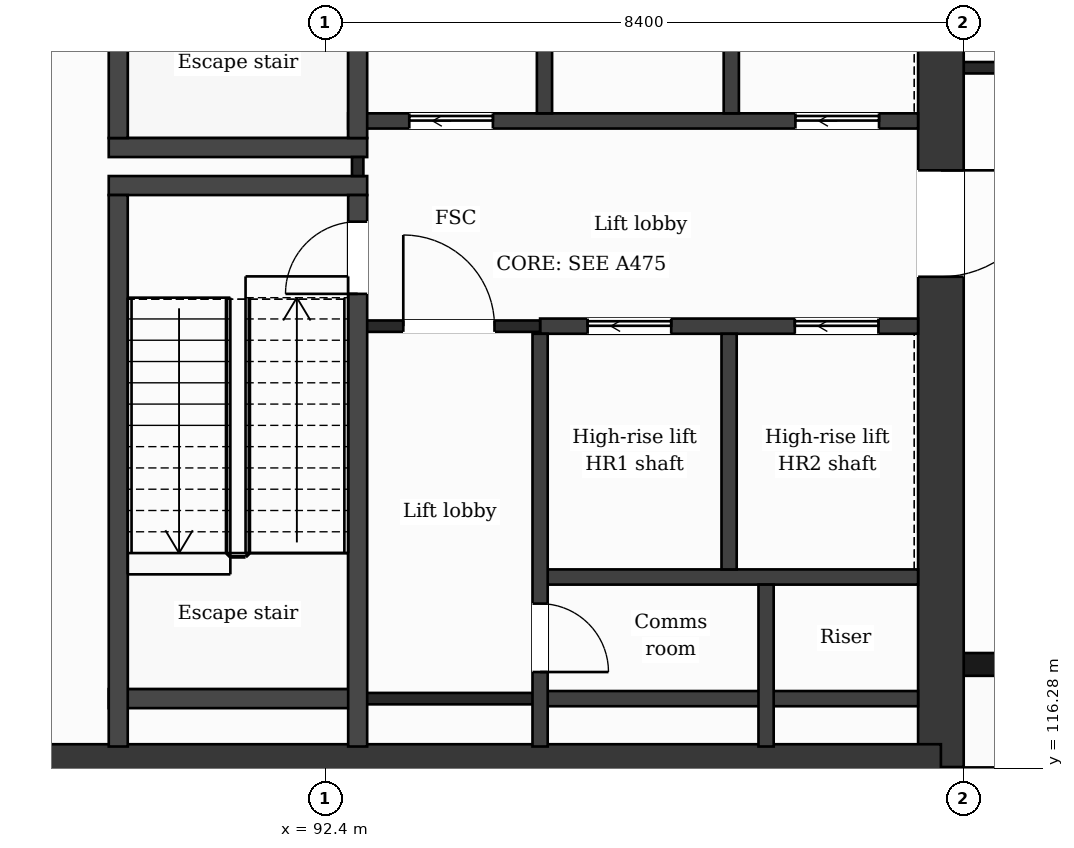
"""IFC4 building model, lengths in metres.
Left out: names, types, materials, properties, quantities, classifications, styles, units other than length and angle.
Written with IfcOpenShell. Run it as: python <this file> out.ifc"""

import sys

from ifc_helpers import new_model, si_unit, direction, frame, frame_2d, origin, place, context, subcontext, project, spatial, rectangle, extrude, element, fill, save


model = new_model("IFC4")
c1 = context("Model", 3, precision=1e-05, world=origin(), true_north=direction((0.0, 1.0)))
c2 = subcontext(c1, "Body", "Model", "MODEL_VIEW")
j1 = project(units=[si_unit("LENGTHUNIT", "METRE"), si_unit("PLANEANGLEUNIT", "RADIAN")], contexts=[c1])
p1 = place(None, origin())
s1 = spatial("IfcSite", under=j1, at=p1, CompositionType="ELEMENT")
p2 = place(p1, origin())
s2 = spatial("IfcBuilding", under=s1, at=p2, CompositionType="ELEMENT")
p3 = place(p2, frame((0.0, 0.0, 303.4)))
s3 = spatial("IfcBuildingStorey", under=s2, at=p3, CompositionType="ELEMENT", Elevation=303.4)
p4 = place(p3, frame((100.5, 132.1, 0.0), z_axis=(0.0, 0.0, 1.0), x_axis=(0.0, -1.0, 0.0)))
e1 = element("IfcWall", 1, at=p4, inside=s3, PredefinedType="SHEAR", context=c2, shape_type="SweptSolid", body=[
    extrude(rectangle(XDim=15.8, YDim=0.6, at=frame_2d((7.9, 0.0))), origin(), (0.0, 0.0, 1.0), 4.5),
])
p5 = place(p4, frame((7.95, 0.0, 0.0)))
e2 = element("IfcOpeningElement", 2, at=p5, cuts=e1, PredefinedType="OPENING", context=c2, shape_type="SweptSolid", body=[
    extrude(rectangle(XDim=1.4, YDim=2.1, at=frame_2d((0.7, 1.05))), frame((0.0, 0.31, 0.0), z_axis=(0.0, -1.0, 0.0), x_axis=(1.0, 0.0, 0.0)), (0.0, 0.0, 1.0), 0.62),
])
p6 = place(p3, frame((100.5, 116.3, 0.0), z_axis=(0.0, 0.0, 1.0), x_axis=(-1.0, 0.0, 0.0)))
e3 = element("IfcWall", 3, at=p6, inside=s3, PredefinedType="SHEAR", context=c2, shape_type="SweptSolid", body=[
    extrude(rectangle(XDim=13.734, YDim=0.6, at=frame_2d((6.867, 0.0))), origin(), (0.0, 0.0, 1.0), 4.5),
])
p7 = place(p3, frame((86.766, 116.3, 0.0), z_axis=(0.0, 0.0, 1.0), x_axis=(0.13341345841, 0.991060466932, 0.0)))
e4 = element("IfcWall", 4, at=p7, inside=s3, PredefinedType="SHEAR", context=c2, shape_type="SweptSolid", body=[
    extrude(rectangle(XDim=15.943, YDim=0.6, at=frame_2d((7.971, 0.0))), origin(), (0.0, 0.0, 1.0), 4.5),
])
p8 = place(p3, frame((100.8, 117.65, 0.0), z_axis=(0.0, 0.0, 1.0), x_axis=(1.0, 0.0, 0.0)))
e5 = element("IfcWall", 5, at=p8, inside=s3, PredefinedType="SOLIDWALL", context=c2, shape_type="SweptSolid", body=[
    extrude(rectangle(XDim=25.2, YDim=0.3, at=frame_2d((12.6, 0.0))), origin(), (0.0, 0.0, 1.0), 4.05),
])
p9 = place(p8, frame((1.55, 0.0, 0.9)))
e6 = element("IfcOpeningElement", 6, at=p9, cuts=e5, PredefinedType="OPENING", context=c2, shape_type="SweptSolid", body=[
    extrude(rectangle(XDim=1.2, YDim=2.1, at=frame_2d((0.6, 1.05))), frame((0.0, 0.16, 0.0), z_axis=(0.0, -1.0, 0.0), x_axis=(1.0, 0.0, 0.0)), (0.0, 0.0, 1.0), 0.32),
])
p10 = place(p8, frame((5.1, 0.0, 0.9)))
e7 = element("IfcOpeningElement", 7, at=p10, cuts=e5, PredefinedType="OPENING", context=c2, shape_type="SweptSolid", body=[
    extrude(rectangle(XDim=2.4, YDim=2.1, at=frame_2d((1.2, 1.05))), frame((0.0, 0.16, 0.0), z_axis=(0.0, -1.0, 0.0), x_axis=(1.0, 0.0, 0.0)), (0.0, 0.0, 1.0), 0.32),
])
p11 = place(p8, frame((9.9, 0.0, 0.0)))
e8 = element("IfcOpeningElement", 8, at=p11, cuts=e5, PredefinedType="OPENING", context=c2, shape_type="SweptSolid", body=[
    extrude(rectangle(XDim=1.2, YDim=2.4, at=frame_2d((0.6, 1.2))), frame((0.0, 0.16, 0.0), z_axis=(0.0, -1.0, 0.0), x_axis=(1.0, 0.0, 0.0)), (0.0, 0.0, 1.0), 0.32),
])
p12 = place(p8, frame((13.5, 0.0, 0.9)))
e9 = element("IfcOpeningElement", 9, at=p12, cuts=e5, PredefinedType="OPENING", context=c2, shape_type="SweptSolid", body=[
    extrude(rectangle(XDim=2.4, YDim=2.1, at=frame_2d((1.2, 1.05))), frame((0.0, 0.16, 0.0), z_axis=(0.0, -1.0, 0.0), x_axis=(1.0, 0.0, 0.0)), (0.0, 0.0, 1.0), 0.32),
])
p13 = place(p8, frame((17.7, 0.0, 0.9)))
e10 = element("IfcOpeningElement", 10, at=p13, cuts=e5, PredefinedType="OPENING", context=c2, shape_type="SweptSolid", body=[
    extrude(rectangle(XDim=2.4, YDim=2.1, at=frame_2d((1.2, 1.05))), frame((0.0, 0.16, 0.0), z_axis=(0.0, -1.0, 0.0), x_axis=(1.0, 0.0, 0.0)), (0.0, 0.0, 1.0), 0.32),
])
p14 = place(p8, frame((21.85, 0.0, 0.9)))
e11 = element("IfcOpeningElement", 11, at=p14, cuts=e5, PredefinedType="OPENING", context=c2, shape_type="SweptSolid", body=[
    extrude(rectangle(XDim=2.4, YDim=2.1, at=frame_2d((1.2, 1.05))), frame((0.0, 0.16, 0.0), z_axis=(0.0, -1.0, 0.0), x_axis=(1.0, 0.0, 0.0)), (0.0, 0.0, 1.0), 0.32),
])
p15 = place(p3, frame((95.227, 117.2, 0.0), z_axis=(0.0, 0.0, 1.0), x_axis=(1.0, 0.0, 0.0)))
e12 = element("IfcWall", 12, at=p15, inside=s3, PredefinedType="PARTITIONING", context=c2, shape_type="SweptSolid", body=[
    extrude(rectangle(XDim=4.973, YDim=0.2, at=frame_2d((2.486, 0.0))), origin(), (0.0, 0.0, 1.0), 4.05),
])
p16 = place(p3, frame((92.827, 117.2, 0.0), z_axis=(0.0, 0.0, 1.0), x_axis=(1.0, 0.0, 0.0)))
e13 = element("IfcWall", 13, at=p16, inside=s3, PredefinedType="PARTITIONING", context=c2, shape_type="SweptSolid", body=[
    extrude(rectangle(XDim=2.4, YDim=0.15, at=frame_2d((1.2, 0.0))), origin(), (0.0, 0.0, 1.0), 4.05),
])
p17 = place(p3, frame((89.552, 117.2, 0.0), z_axis=(0.0, 0.0, 1.0), x_axis=(1.0, 0.0, 0.0)))
e14 = element("IfcWall", 14, at=p17, inside=s3, PredefinedType="PARTITIONING", context=c2, shape_type="SweptSolid", body=[
    extrude(rectangle(XDim=3.275, YDim=0.25, at=frame_2d((1.637, 0.0))), origin(), (0.0, 0.0, 1.0), 4.05),
])
p18 = place(p3, frame((95.227, 118.8, 0.0), z_axis=(0.0, 0.0, 1.0), x_axis=(1.0, 0.0, 0.0)))
e15 = element("IfcWall", 15, at=p18, inside=s3, PredefinedType="PARTITIONING", context=c2, shape_type="SweptSolid", body=[
    extrude(rectangle(XDim=4.973, YDim=0.2, at=frame_2d((2.486, 0.0))), origin(), (0.0, 0.0, 1.0), 4.05),
])
p19 = place(p3, frame((95.227, 122.1, 0.0), z_axis=(0.0, 0.0, 1.0), x_axis=(1.0, 0.0, 0.0)))
e16 = element("IfcWall", 16, at=p19, inside=s3, PredefinedType="PARTITIONING", context=c2, shape_type="SweptSolid", body=[
    extrude(rectangle(XDim=4.973, YDim=0.2, at=frame_2d((2.486, 0.0))), origin(), (0.0, 0.0, 1.0), 4.05),
])
p20 = place(p19, frame((0.625, 0.0, 0.0)))
e17 = element("IfcOpeningElement", 17, at=p20, cuts=e16, PredefinedType="OPENING", context=c2, shape_type="SweptSolid", body=[
    extrude(rectangle(XDim=1.1, YDim=2.1, at=frame_2d((0.55, 1.05))), frame((0.0, 0.11, 0.0), z_axis=(0.0, -1.0, 0.0), x_axis=(1.0, 0.0, 0.0)), (0.0, 0.0, 1.0), 0.22),
])
p21 = place(p19, frame((3.351, 0.0, 0.0)))
e18 = element("IfcOpeningElement", 18, at=p21, cuts=e16, PredefinedType="OPENING", context=c2, shape_type="SweptSolid", body=[
    extrude(rectangle(XDim=1.1, YDim=2.1, at=frame_2d((0.55, 1.05))), frame((0.0, 0.11, 0.0), z_axis=(0.0, -1.0, 0.0), x_axis=(1.0, 0.0, 0.0)), (0.0, 0.0, 1.0), 0.22),
])
p22 = place(p3, frame((92.827, 122.1, 0.0), z_axis=(0.0, 0.0, 1.0), x_axis=(1.0, 0.0, 0.0)))
e19 = element("IfcWall", 19, at=p22, inside=s3, PredefinedType="PARTITIONING", context=c2, shape_type="SweptSolid", body=[
    extrude(rectangle(XDim=2.4, YDim=0.15, at=frame_2d((1.2, 0.0))), origin(), (0.0, 0.0, 1.0), 4.05),
])
p23 = place(p22, frame((0.6, 0.0, 0.0)))
e20 = element("IfcOpeningElement", 20, at=p23, cuts=e19, PredefinedType="OPENING", context=c2, shape_type="SweptSolid", body=[
    extrude(rectangle(XDim=1.2, YDim=2.1, at=frame_2d((0.6, 1.05))), frame((0.0, 0.085, 0.0), z_axis=(0.0, -1.0, 0.0), x_axis=(1.0, 0.0, 0.0)), (0.0, 0.0, 1.0), 0.17),
])
for number, where, z_axis, x_axis in (
    (21, (89.552, 123.95, 0.0), (0.0, 0.0, 1.0), (1.0, 0.0, 0.0)),
    (22, (89.552, 124.45, 0.0), (0.0, 0.0, 1.0), (1.0, 0.0, 0.0)),
):
    element("IfcWall", number, at=place(p3, frame(where, z_axis=z_axis, x_axis=x_axis)), inside=s3, PredefinedType="PARTITIONING", context=c2, shape_type="SweptSolid", body=[
        extrude(rectangle(XDim=3.4, YDim=0.25, at=frame_2d((1.7, 0.0))), origin(), (0.0, 0.0, 1.0), 4.05),
    ])
p24 = place(p3, frame((92.702, 124.8, 0.0), z_axis=(0.0, 0.0, 1.0), x_axis=(1.0, 0.0, 0.0)))
e23 = element("IfcWall", 23, at=p24, inside=s3, PredefinedType="PARTITIONING", context=c2, shape_type="SweptSolid", body=[
    extrude(rectangle(XDim=7.498, YDim=0.2, at=frame_2d((3.749, 0.0))), origin(), (0.0, 0.0, 1.0), 4.05),
])
p25 = place(p24, frame((0.804, 0.0, 0.0)))
e24 = element("IfcOpeningElement", 24, at=p25, cuts=e23, PredefinedType="OPENING", context=c2, shape_type="SweptSolid", body=[
    extrude(rectangle(XDim=1.1, YDim=2.1, at=frame_2d((0.55, 1.05))), frame((0.0, 0.11, 0.0), z_axis=(0.0, -1.0, 0.0), x_axis=(1.0, 0.0, 0.0)), (0.0, 0.0, 1.0), 0.22),
])
p26 = place(p24, frame((5.884, 0.0, 0.0)))
e25 = element("IfcOpeningElement", 25, at=p26, cuts=e23, PredefinedType="OPENING", context=c2, shape_type="SweptSolid", body=[
    extrude(rectangle(XDim=1.1, YDim=2.1, at=frame_2d((0.55, 1.05))), frame((0.0, 0.11, 0.0), z_axis=(0.0, -1.0, 0.0), x_axis=(1.0, 0.0, 0.0)), (0.0, 0.0, 1.0), 0.22),
])
p27 = place(p3, frame((100.8, 125.5, 0.0), z_axis=(0.0, 0.0, 1.0), x_axis=(1.0, 0.0, 0.0)))
e26 = element("IfcWall", 26, at=p27, inside=s3, PredefinedType="PARTITIONING", context=c2, shape_type="SweptSolid", body=[
    extrude(rectangle(XDim=21.675, YDim=0.15, at=frame_2d((10.837, 0.0))), origin(), (0.0, 0.0, 1.0), 4.05),
])
p28 = place(p27, frame((2.0, 0.0, 0.0)))
e27 = element("IfcOpeningElement", 27, at=p28, cuts=e26, PredefinedType="OPENING", context=c2, shape_type="SweptSolid", body=[
    extrude(rectangle(XDim=1.2, YDim=2.1, at=frame_2d((0.6, 1.05))), frame((0.0, 0.085, 0.0), z_axis=(0.0, -1.0, 0.0), x_axis=(1.0, 0.0, 0.0)), (0.0, 0.0, 1.0), 0.17),
])
p29 = place(p27, frame((6.84, 0.0, 0.0)))
e28 = element("IfcOpeningElement", 28, at=p29, cuts=e26, PredefinedType="OPENING", context=c2, shape_type="SweptSolid", body=[
    extrude(rectangle(XDim=1.0, YDim=2.1, at=frame_2d((0.5, 1.05))), frame((0.0, 0.085, 0.0), z_axis=(0.0, -1.0, 0.0), x_axis=(1.0, 0.0, 0.0)), (0.0, 0.0, 1.0), 0.17),
])
p30 = place(p27, frame((12.2, 0.0, 0.0)))
e29 = element("IfcOpeningElement", 29, at=p30, cuts=e26, PredefinedType="OPENING", context=c2, shape_type="SweptSolid", body=[
    extrude(rectangle(XDim=1.0, YDim=2.1, at=frame_2d((0.5, 1.05))), frame((0.0, 0.085, 0.0), z_axis=(0.0, -1.0, 0.0), x_axis=(1.0, 0.0, 0.0)), (0.0, 0.0, 1.0), 0.17),
])
p31 = place(p27, frame((15.2, 0.0, 0.0)))
e30 = element("IfcOpeningElement", 30, at=p31, cuts=e26, PredefinedType="OPENING", context=c2, shape_type="SweptSolid", body=[
    extrude(rectangle(XDim=1.0, YDim=2.1, at=frame_2d((0.5, 1.05))), frame((0.0, 0.085, 0.0), z_axis=(0.0, -1.0, 0.0), x_axis=(1.0, 0.0, 0.0)), (0.0, 0.0, 1.0), 0.17),
])
p32 = place(p3, frame((89.677, 116.57, 0.0), z_axis=(0.0, 0.0, 1.0), x_axis=(0.0, 1.0, 0.0)))
e31 = element("IfcWall", 31, at=p32, inside=s3, PredefinedType="PARTITIONING", context=c2, shape_type="SweptSolid", body=[
    extrude(rectangle(XDim=7.255, YDim=0.25, at=frame_2d((3.627, 0.0))), origin(), (0.0, 0.0, 1.0), 4.05),
])
p33 = place(p3, frame((89.677, 124.575, 0.0), z_axis=(0.0, 0.0, 1.0), x_axis=(0.0, 1.0, 0.0)))
e32 = element("IfcWall", 32, at=p33, inside=s3, PredefinedType="PARTITIONING", context=c2, shape_type="SweptSolid", body=[
    extrude(rectangle(XDim=7.255, YDim=0.25, at=frame_2d((3.627, 0.0))), origin(), (0.0, 0.0, 1.0), 4.05),
])
p34 = place(p3, frame((92.827, 124.075, 0.0), z_axis=(0.0, 0.0, 1.0), x_axis=(0.0, 1.0, 0.0)))
e33 = element("IfcWall", 33, at=p34, inside=s3, PredefinedType="PARTITIONING", context=c2, shape_type="SweptSolid", body=[
    extrude(rectangle(XDim=0.25, YDim=0.15, at=frame_2d((0.125, 0.0))), origin(), (0.0, 0.0, 1.0), 4.05),
])
p35 = place(p3, frame((92.827, 116.57, 0.0), z_axis=(0.0, 0.0, 1.0), x_axis=(0.0, 1.0, 0.0)))
e34 = element("IfcWall", 34, at=p35, inside=s3, PredefinedType="PARTITIONING", context=c2, shape_type="SweptSolid", body=[
    extrude(rectangle(XDim=7.255, YDim=0.25, at=frame_2d((3.627, 0.0))), origin(), (0.0, 0.0, 1.0), 4.05),
])
p36 = place(p35, frame((5.955, 0.0, 0.0)))
e35 = element("IfcOpeningElement", 35, at=p36, cuts=e34, PredefinedType="OPENING", context=c2, shape_type="SweptSolid", body=[
    extrude(rectangle(XDim=0.95, YDim=2.1, at=frame_2d((0.475, 1.05))), frame((0.0, 0.135, 0.0), z_axis=(0.0, -1.0, 0.0), x_axis=(1.0, 0.0, 0.0)), (0.0, 0.0, 1.0), 0.27),
])
p37 = place(p3, frame((92.827, 124.575, 0.0), z_axis=(0.0, 0.0, 1.0), x_axis=(0.0, 1.0, 0.0)))
e36 = element("IfcWall", 36, at=p37, inside=s3, PredefinedType="PARTITIONING", context=c2, shape_type="SweptSolid", body=[
    extrude(rectangle(XDim=7.255, YDim=0.25, at=frame_2d((3.627, 0.0))), origin(), (0.0, 0.0, 1.0), 4.05),
])
p38 = place(p37, frame((5.325, 0.0, 0.0)))
e37 = element("IfcOpeningElement", 37, at=p38, cuts=e36, PredefinedType="OPENING", context=c2, shape_type="SweptSolid", body=[
    extrude(rectangle(XDim=1.0, YDim=2.1, at=frame_2d((0.5, 1.05))), frame((0.0, 0.135, 0.0), z_axis=(0.0, -1.0, 0.0), x_axis=(1.0, 0.0, 0.0)), (0.0, 0.0, 1.0), 0.27),
])
p39 = place(p3, frame((95.227, 116.57, 0.0), z_axis=(0.0, 0.0, 1.0), x_axis=(0.0, 1.0, 0.0)))
e38 = element("IfcWall", 38, at=p39, inside=s3, PredefinedType="PARTITIONING", context=c2, shape_type="SweptSolid", body=[
    extrude(rectangle(XDim=5.43, YDim=0.2, at=frame_2d((2.715, 0.0))), origin(), (0.0, 0.0, 1.0), 4.05),
])
p40 = place(p39, frame((0.98, 0.0, 0.0)))
e39 = element("IfcOpeningElement", 39, at=p40, cuts=e38, PredefinedType="OPENING", context=c2, shape_type="SweptSolid", body=[
    extrude(rectangle(XDim=0.9, YDim=2.1, at=frame_2d((0.45, 1.05))), frame((0.0, 0.11, 0.0), z_axis=(0.0, -1.0, 0.0), x_axis=(1.0, 0.0, 0.0)), (0.0, 0.0, 1.0), 0.22),
])
for number, where, z_axis, x_axis in (
    (40, (95.285, 124.9, 0.0), (0.0, 0.0, 1.0), (0.0, 1.0, 0.0)),
    (41, (97.713, 118.9, 0.0), (0.0, 0.0, 1.0), (0.0, 1.0, 0.0)),
    (42, (97.742, 124.9, 0.0), (0.0, 0.0, 1.0), (0.0, 1.0, 0.0)),
):
    element("IfcWall", number, at=place(p3, frame(where, z_axis=z_axis, x_axis=x_axis)), inside=s3, PredefinedType="PARTITIONING", context=c2, shape_type="SweptSolid", body=[
        extrude(rectangle(XDim=3.1, YDim=0.2, at=frame_2d((1.55, 0.0))), origin(), (0.0, 0.0, 1.0), 4.05),
    ])
p41 = place(p3, frame((98.2, 116.57, 0.0), z_axis=(0.0, 0.0, 1.0), x_axis=(0.0, 1.0, 0.0)))
e43 = element("IfcWall", 43, at=p41, inside=s3, PredefinedType="PARTITIONING", context=c2, shape_type="SweptSolid", body=[
    extrude(rectangle(XDim=2.13, YDim=0.2, at=frame_2d((1.065, 0.0))), origin(), (0.0, 0.0, 1.0), 4.05),
])
p42 = place(p23, origin())
e44 = element("IfcDoor", 44, at=p42, inside=s3, OperationType="SINGLE_SWING_LEFT", PredefinedType="DOOR", context=c2, shape_type="SweptSolid", body=[
    extrude(rectangle(XDim=1.2, YDim=2.1, at=frame_2d((0.6, 1.05))), frame((0.0, 0.025, 0.0), z_axis=(0.0, -1.0, 0.0), x_axis=(1.0, 0.0, 0.0)), (0.0, 0.0, 1.0), 0.05),
])
fill(e20, e44)
p43 = place(p20, origin())
e45 = element("IfcDoor", 45, at=p43, inside=s3, OperationType="SLIDING_TO_LEFT", PredefinedType="DOOR", context=c2, shape_type="SweptSolid", body=[
    extrude(rectangle(XDim=1.1, YDim=2.1, at=frame_2d((0.55, 1.05))), frame((0.0, 0.025, 0.0), z_axis=(0.0, -1.0, 0.0), x_axis=(1.0, 0.0, 0.0)), (0.0, 0.0, 1.0), 0.05),
])
fill(e17, e45)
p44 = place(p21, origin())
e46 = element("IfcDoor", 46, at=p44, inside=s3, OperationType="SLIDING_TO_LEFT", PredefinedType="DOOR", context=c2, shape_type="SweptSolid", body=[
    extrude(rectangle(XDim=1.1, YDim=2.1, at=frame_2d((0.55, 1.05))), frame((0.0, 0.025, 0.0), z_axis=(0.0, -1.0, 0.0), x_axis=(1.0, 0.0, 0.0)), (0.0, 0.0, 1.0), 0.05),
])
fill(e18, e46)
p45 = place(p25, origin())
e47 = element("IfcDoor", 47, at=p45, inside=s3, OperationType="SLIDING_TO_LEFT", PredefinedType="DOOR", context=c2, shape_type="SweptSolid", body=[
    extrude(rectangle(XDim=1.1, YDim=2.1, at=frame_2d((0.55, 1.05))), frame((0.0, 0.025, 0.0), z_axis=(0.0, -1.0, 0.0), x_axis=(1.0, 0.0, 0.0)), (0.0, 0.0, 1.0), 0.05),
])
fill(e24, e47)
p46 = place(p26, origin())
e48 = element("IfcDoor", 48, at=p46, inside=s3, OperationType="SLIDING_TO_LEFT", PredefinedType="DOOR", context=c2, shape_type="SweptSolid", body=[
    extrude(rectangle(XDim=1.1, YDim=2.1, at=frame_2d((0.55, 1.05))), frame((0.0, 0.025, 0.0), z_axis=(0.0, -1.0, 0.0), x_axis=(1.0, 0.0, 0.0)), (0.0, 0.0, 1.0), 0.05),
])
fill(e25, e48)
p47 = place(p36, origin())
e49 = element("IfcDoor", 49, at=p47, inside=s3, OperationType="SINGLE_SWING_LEFT", PredefinedType="DOOR", context=c2, shape_type="SweptSolid", body=[
    extrude(rectangle(XDim=0.95, YDim=2.1, at=frame_2d((0.475, 1.05))), frame((0.0, 0.025, 0.0), z_axis=(0.0, -1.0, 0.0), x_axis=(1.0, 0.0, 0.0)), (0.0, 0.0, 1.0), 0.05),
])
fill(e35, e49)
p48 = place(p40, origin())
e50 = element("IfcDoor", 50, at=p48, inside=s3, OperationType="SINGLE_SWING_LEFT", PredefinedType="DOOR", context=c2, shape_type="SweptSolid", body=[
    extrude(rectangle(XDim=0.9, YDim=2.1, at=frame_2d((0.45, 1.05))), frame((0.0, 0.025, 0.0), z_axis=(0.0, -1.0, 0.0), x_axis=(1.0, 0.0, 0.0)), (0.0, 0.0, 1.0), 0.05),
])
fill(e39, e50)
p49 = place(p5, origin())
e51 = element("IfcDoor", 51, at=p49, inside=s3, OperationType="SINGLE_SWING_LEFT", PredefinedType="DOOR", context=c2, shape_type="SweptSolid", body=[
    extrude(rectangle(XDim=1.4, YDim=2.1, at=frame_2d((0.7, 1.05))), frame((0.0, 0.025, 0.0), z_axis=(0.0, -1.0, 0.0), x_axis=(1.0, 0.0, 0.0)), (0.0, 0.0, 1.0), 0.05),
])
fill(e2, e51)
save(model, sys.argv[1])
